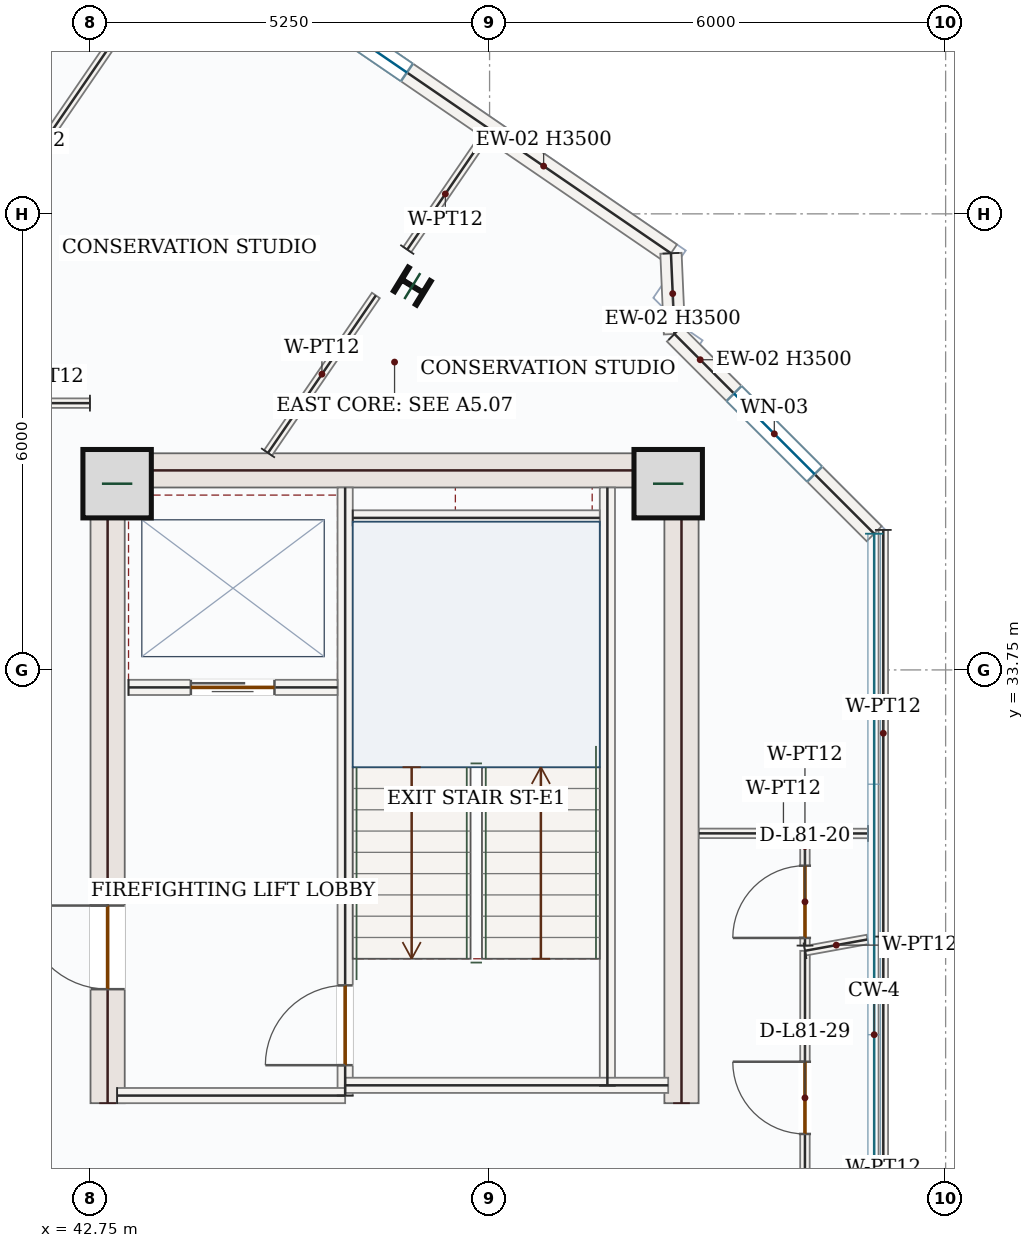
"""IFC4 building model, lengths in metres.
Left out: names, types, materials, properties, quantities, classifications, styles, units other than length and angle.
Written with IfcOpenShell. Run it as: python <this file> out.ifc"""

import sys

from ifc_helpers import new_model, si_unit, direction, frame, frame_2d, origin, origin_2d, place, context, subcontext, project, spatial, rectangle, i_section, extrude, source, transform, mapped, element, fill, save


model = new_model("IFC4")
c1 = context("Model", 3, precision=1e-05, world=origin(), true_north=direction((0.0, 1.0)))
c2 = subcontext(c1, "Body", "Model", "MODEL_VIEW")
j1 = project(units=[si_unit("LENGTHUNIT", "METRE"), si_unit("PLANEANGLEUNIT", "RADIAN")], contexts=[c1])
p1 = place(None, origin())
s1 = spatial("IfcSite", under=j1, at=p1, CompositionType="ELEMENT")
p2 = place(p1, origin())
s2 = spatial("IfcBuilding", under=s1, at=p2, CompositionType="ELEMENT")
p3 = place(p2, frame((0.0, 0.0, 334.8)))
s3 = spatial("IfcBuildingStorey", under=s2, at=p3, CompositionType="ELEMENT", Elevation=334.8)
p4 = place(p3, frame((42.975, 28.05, 0.0), z_axis=(0.0, 0.0, 1.0), x_axis=(0.0, 1.0, 0.0)))
e1 = element("IfcWall", 1, at=p4, inside=s3, PredefinedType="SHEAR", context=c2, shape_type="SweptSolid", body=[
    extrude(rectangle(XDim=8.55, YDim=0.45, at=frame_2d((4.275, 0.0))), origin(), (0.0, 0.0, 1.0), 3.5),
])
p5 = place(p4, frame((1.5, 0.0, 0.0)))
e2 = element("IfcOpeningElement", 2, at=p5, cuts=e1, PredefinedType="OPENING", context=c2, shape_type="SweptSolid", body=[
    extrude(rectangle(XDim=1.1, YDim=2.2, at=frame_2d((0.55, 1.1))), frame((0.0, 0.235, 0.0), z_axis=(0.0, -1.0, 0.0), x_axis=(1.0, 0.0, 0.0)), (0.0, 0.0, 1.0), 0.47),
])
m1 = source(origin(), c2, "Body", "SweptSolid", [
    extrude(rectangle(XDim=8.55, YDim=0.45, at=frame_2d((4.275, 0.0))), origin(), (0.0, 0.0, 1.0), 3.5),
])
p6 = place(p3, frame((50.525, 28.05, 0.0), z_axis=(0.0, 0.0, 1.0), x_axis=(0.0, 1.0, 0.0)))
e3 = element("IfcWall", 3, at=p6, inside=s3, PredefinedType="SHEAR", context=c2, shape_type="MappedRepresentation", body=[
    mapped(m1, transform((0.0, 0.0, 0.0), x_axis=(1.0, 0.0, 0.0), y_axis=(0.0, 1.0, 0.0), z_axis=(0.0, 0.0, 1.0), scale=1.0)),
])
m2 = source(origin(), c2, "Body", "SweptSolid", [
    extrude(rectangle(XDim=7.1, YDim=0.45, at=frame_2d((3.55, 0.0))), origin(), (0.0, 0.0, 1.0), 3.5),
])
p7 = place(p3, frame((43.2, 36.375, 0.0), z_axis=(0.0, 0.0, 1.0), x_axis=(1.0, 0.0, 0.0)))
e4 = element("IfcWall", 4, at=p7, inside=s3, PredefinedType="SHEAR", context=c2, shape_type="MappedRepresentation", body=[
    mapped(m2, transform((0.0, 0.0, 0.0), x_axis=(1.0, 0.0, 0.0), y_axis=(0.0, 1.0, 0.0), z_axis=(0.0, 0.0, 1.0), scale=1.0)),
])
m3 = source(origin(), c2, "Body", "SweptSolid", [
    extrude(rectangle(XDim=0.9, YDim=0.9, at=origin_2d()), origin(), (0.0, 0.0, 1.0), 3.75),
])
for number, where, z_axis, x_axis in (
    (5, (43.1, 36.2, 0.0), (0.0, 0.0, 1.0), (1.0, 0.0, 0.0)),
    (6, (50.35, 36.2, 0.0), (0.0, 0.0, 1.0), (1.0, 0.0, 0.0)),
):
    element("IfcColumn", number, at=place(p3, frame(where, z_axis=z_axis, x_axis=x_axis)), inside=s3, PredefinedType="COLUMN", context=c2, shape_type="MappedRepresentation", body=[
        mapped(m3, transform((0.0, 0.0, 0.0), x_axis=(1.0, 0.0, 0.0), y_axis=(0.0, 1.0, 0.0), z_axis=(0.0, 0.0, 1.0), scale=1.0)),
    ])
m4 = source(origin(), c2, "Body", "SweptSolid", [
    extrude(i_section(OverallWidth=0.369, OverallDepth=0.356, WebThickness=0.011, FlangeThickness=0.018, FilletRadius=0.018, at=origin_2d()), origin(), (0.0, 0.0, 1.0), 3.75),
])
p8 = place(p3, frame((46.984, 38.8, 0.0), z_axis=(0.0, 0.0, 1.0), x_axis=(0.522498564716, 0.852640164354, 0.0)))
e7 = element("IfcColumn", 7, at=p8, inside=s3, PredefinedType="COLUMN", context=c2, shape_type="MappedRepresentation", body=[
    mapped(m4, transform((0.0, 0.0, 0.0), x_axis=(1.0, 0.0, 0.0), y_axis=(0.0, 1.0, 0.0), z_axis=(0.0, 0.0, 1.0), scale=1.0)),
])
p9 = place(p3, frame((42.201, 44.836, 0.0), z_axis=(0.0, 0.0, 1.0), x_axis=(0.825121888295, -0.56495474992, 0.0)))
e8 = element("IfcWall", 8, at=p9, inside=s3, PredefinedType="SOLIDWALL", context=c2, shape_type="SweptSolid", body=[
    extrude(rectangle(XDim=9.92, YDim=0.28, at=frame_2d((4.96, 0.0))), origin(), (0.0, 0.0, 1.0), 3.5),
])
p10 = place(p9, frame((4.21, 0.0, 0.85)))
e9 = element("IfcOpeningElement", 9, at=p10, cuts=e8, PredefinedType="OPENING", context=c2, shape_type="SweptSolid", body=[
    extrude(rectangle(XDim=1.5, YDim=1.5, at=frame_2d((0.75, 0.75))), frame((0.0, 0.15, 0.0), z_axis=(0.0, -1.0, 0.0), x_axis=(1.0, 0.0, 0.0)), (0.0, 0.0, 1.0), 0.3),
])
m5 = source(origin(), c2, "Body", "SweptSolid", [
    extrude(rectangle(XDim=1.063, YDim=0.28, at=frame_2d((0.531, 0.0))), origin(), (0.0, 0.0, 1.0), 3.5),
])
p11 = place(p3, frame((50.386, 39.231, 0.0), z_axis=(0.0, 0.0, 1.0), x_axis=(0.043417286211, -0.999057025028, 0.0)))
e10 = element("IfcWall", 10, at=p11, inside=s3, PredefinedType="SOLIDWALL", context=c2, shape_type="MappedRepresentation", body=[
    mapped(m5, transform((0.0, 0.0, 0.0), x_axis=(1.0, 0.0, 0.0), y_axis=(0.0, 1.0, 0.0), z_axis=(0.0, 0.0, 1.0), scale=1.0)),
])
p12 = place(p3, frame((50.432, 38.17, 0.0), z_axis=(0.0, 0.0, 1.0), x_axis=(0.707106781187, -0.707106781187, 0.0)))
e11 = element("IfcWall", 11, at=p12, inside=s3, PredefinedType="SOLIDWALL", context=c2, shape_type="SweptSolid", body=[
    extrude(rectangle(XDim=3.716, YDim=0.28, at=frame_2d((1.858, 0.0))), origin(), (0.0, 0.0, 1.0), 3.5),
])
p13 = place(p12, frame((1.108, 0.0, 0.85)))
e12 = element("IfcOpeningElement", 12, at=p13, cuts=e11, PredefinedType="OPENING", context=c2, shape_type="SweptSolid", body=[
    extrude(rectangle(XDim=1.5, YDim=1.5, at=frame_2d((0.75, 0.75))), frame((0.0, 0.15, 0.0), z_axis=(0.0, -1.0, 0.0), x_axis=(1.0, 0.0, 0.0)), (0.0, 0.0, 1.0), 0.3),
])
m6 = source(origin(), c2, "Body", "SweptSolid", [
    extrude(rectangle(XDim=7.87, YDim=0.2, at=frame_2d((3.935, 0.0))), origin(), (0.0, 0.0, 1.0), 3.5),
])
p14 = place(p3, frame((49.55, 28.28, 0.0), z_axis=(0.0, 0.0, 1.0), x_axis=(0.0, 1.0, 0.0)))
e13 = element("IfcWall", 13, at=p14, inside=s3, PredefinedType="SOLIDWALL", context=c2, shape_type="MappedRepresentation", body=[
    mapped(m6, transform((0.0, 0.0, 0.0), x_axis=(1.0, 0.0, 0.0), y_axis=(0.0, 1.0, 0.0), z_axis=(0.0, 0.0, 1.0), scale=1.0)),
])
p15 = place(p3, frame((46.1, 28.15, 0.0), z_axis=(0.0, 0.0, 1.0), x_axis=(0.0, 1.0, 0.0)))
e14 = element("IfcWall", 14, at=p15, inside=s3, PredefinedType="SOLIDWALL", context=c2, shape_type="SweptSolid", body=[
    extrude(rectangle(XDim=8.0, YDim=0.2, at=frame_2d((4.0, 0.0))), origin(), (0.0, 0.0, 1.0), 3.5),
])
p16 = place(p15, frame((0.4, 0.0, 0.0)))
e15 = element("IfcOpeningElement", 15, at=p16, cuts=e14, PredefinedType="OPENING", context=c2, shape_type="SweptSolid", body=[
    extrude(rectangle(XDim=1.05, YDim=2.15, at=frame_2d((0.525, 1.075))), frame((0.0, 0.11, 0.0), z_axis=(0.0, -1.0, 0.0), x_axis=(1.0, 0.0, 0.0)), (0.0, 0.0, 1.0), 0.22),
])
m7 = source(origin(), c2, "Body", "SweptSolid", [
    extrude(rectangle(XDim=3.0, YDim=0.2, at=frame_2d((1.5, 0.0))), origin(), (0.0, 0.0, 1.0), 3.5),
])
p17 = place(p3, frame((43.1, 28.15, 0.0), z_axis=(0.0, 0.0, 1.0), x_axis=(1.0, 0.0, 0.0)))
e16 = element("IfcWall", 16, at=p17, inside=s3, PredefinedType="SOLIDWALL", context=c2, shape_type="MappedRepresentation", body=[
    mapped(m7, transform((0.0, 0.0, 0.0), x_axis=(1.0, 0.0, 0.0), y_axis=(0.0, 1.0, 0.0), z_axis=(0.0, 0.0, 1.0), scale=1.0)),
])
m8 = source(origin(), c2, "Body", "SweptSolid", [
    extrude(rectangle(XDim=4.25, YDim=0.2, at=frame_2d((2.125, 0.0))), origin(), (0.0, 0.0, 1.0), 3.5),
])
p18 = place(p3, frame((46.1, 28.285, 0.0), z_axis=(0.0, 0.0, 1.0), x_axis=(1.0, 0.0, 0.0)))
e17 = element("IfcWall", 17, at=p18, inside=s3, PredefinedType="SOLIDWALL", context=c2, shape_type="MappedRepresentation", body=[
    mapped(m8, transform((0.0, 0.0, 0.0), x_axis=(1.0, 0.0, 0.0), y_axis=(0.0, 1.0, 0.0), z_axis=(0.0, 0.0, 1.0), scale=1.0)),
])
m9 = source(origin(), c2, "Body", "SweptSolid", [
    extrude(rectangle(XDim=3.25, YDim=0.2, at=frame_2d((1.625, 0.0))), origin(), (0.0, 0.0, 1.0), 3.5),
])
p19 = place(p3, frame((46.2, 35.75, 0.0), z_axis=(0.0, 0.0, 1.0), x_axis=(1.0, 0.0, 0.0)))
e18 = element("IfcWall", 18, at=p19, inside=s3, PredefinedType="SOLIDWALL", context=c2, shape_type="MappedRepresentation", body=[
    mapped(m9, transform((0.0, 0.0, 0.0), x_axis=(1.0, 0.0, 0.0), y_axis=(0.0, 1.0, 0.0), z_axis=(0.0, 0.0, 1.0), scale=1.0)),
])
p20 = place(p3, frame((43.25, 33.52, 0.0), z_axis=(0.0, 0.0, 1.0), x_axis=(1.0, 0.0, 0.0)))
e19 = element("IfcWall", 19, at=p20, inside=s3, PredefinedType="SOLIDWALL", context=c2, shape_type="SweptSolid", body=[
    extrude(rectangle(XDim=2.75, YDim=0.2, at=frame_2d((1.375, 0.0))), origin(), (0.0, 0.0, 1.0), 3.5),
])
p21 = place(p20, frame((0.82, 0.0, 0.0)))
e20 = element("IfcOpeningElement", 20, at=p21, cuts=e19, PredefinedType="OPENING", context=c2, shape_type="SweptSolid", body=[
    extrude(rectangle(XDim=1.1, YDim=2.15, at=frame_2d((0.55, 1.075))), frame((0.0, 0.11, 0.0), z_axis=(0.0, -1.0, 0.0), x_axis=(1.0, 0.0, 0.0)), (0.0, 0.0, 1.0), 0.22),
])
p22 = place(p3, frame((52.147, 22.47, 0.0), z_axis=(0.0, 0.0, 1.0), x_axis=(0.000321874581, 0.999999948198, 0.0)))
e21 = element("IfcWall", 21, at=p22, inside=s3, PredefinedType="PARTITIONING", context=c2, shape_type="SweptSolid", body=[
    extrude(rectangle(XDim=7.585, YDim=0.125, at=frame_2d((3.792, 0.0))), origin(), (0.0, 0.0, 1.0), 3.5),
])
p23 = place(p22, frame((5.175, 0.0, 0.0)))
e22 = element("IfcOpeningElement", 22, at=p23, cuts=e21, PredefinedType="OPENING", context=c2, shape_type="SweptSolid", body=[
    extrude(rectangle(XDim=0.95, YDim=2.15, at=frame_2d((0.475, 1.075))), frame((0.0, 0.073, 0.0), z_axis=(0.0, -1.0, 0.0), x_axis=(1.0, 0.0, 0.0)), (0.0, 0.0, 1.0), 0.145),
])
m10 = source(origin(), c2, "Body", "SweptSolid", [
    extrude(rectangle(XDim=0.836, YDim=0.125, at=frame_2d((0.418, 0.0))), origin(), (0.0, 0.0, 1.0), 3.5),
])
p24 = place(p3, frame((52.15, 30.055, 0.0), z_axis=(0.0, 0.0, 1.0), x_axis=(0.983949253333, 0.178448499195, 0.0)))
e23 = element("IfcWall", 23, at=p24, inside=s3, PredefinedType="PARTITIONING", context=c2, shape_type="MappedRepresentation", body=[
    mapped(m10, transform((0.0, 0.0, 0.0), x_axis=(1.0, 0.0, 0.0), y_axis=(0.0, 1.0, 0.0), z_axis=(0.0, 0.0, 1.0), scale=1.0)),
])
m11 = source(origin(), c2, "Body", "SweptSolid", [
    extrude(rectangle(XDim=6.777, YDim=0.125, at=frame_2d((3.388, 0.0))), origin(), (0.0, 0.0, 1.0), 3.5),
])
p25 = place(p3, frame((53.18, 30.242, 0.0), z_axis=(0.0, 0.0, 1.0), x_axis=(7.2053896e-05, -0.999999997404, 0.0)))
e24 = element("IfcWall", 24, at=p25, inside=s3, PredefinedType="PARTITIONING", context=c2, shape_type="MappedRepresentation", body=[
    mapped(m11, transform((0.0, 0.0, 0.0), x_axis=(1.0, 0.0, 0.0), y_axis=(0.0, 1.0, 0.0), z_axis=(0.0, 0.0, 1.0), scale=1.0)),
])
m12 = source(origin(), c2, "Body", "SweptSolid", [
    extrude(rectangle(XDim=2.223, YDim=0.125, at=frame_2d((1.111, 0.0))), origin(), (0.0, 0.0, 1.0), 3.5),
])
p26 = place(p3, frame((52.978, 31.598, 0.0), z_axis=(0.0, 0.0, 1.0), x_axis=(-0.999999704402, 0.000768892567, 0.0)))
e25 = element("IfcWall", 25, at=p26, inside=s3, PredefinedType="PARTITIONING", context=c2, shape_type="MappedRepresentation", body=[
    mapped(m12, transform((0.0, 0.0, 0.0), x_axis=(1.0, 0.0, 0.0), y_axis=(0.0, 1.0, 0.0), z_axis=(0.0, 0.0, 1.0), scale=1.0)),
])
m13 = source(origin(), c2, "Body", "SweptSolid", [
    extrude(rectangle(XDim=2.511, YDim=0.125, at=frame_2d((1.255, 0.0))), origin(), (0.0, 0.0, 1.0), 3.5),
])
p27 = place(p3, frame((45.085, 36.605, 0.0), z_axis=(0.0, 0.0, 1.0), x_axis=(0.564980194272, 0.825104466162, 0.0)))
e26 = element("IfcWall", 26, at=p27, inside=s3, PredefinedType="PARTITIONING", context=c2, shape_type="MappedRepresentation", body=[
    mapped(m13, transform((0.0, 0.0, 0.0), x_axis=(1.0, 0.0, 0.0), y_axis=(0.0, 1.0, 0.0), z_axis=(0.0, 0.0, 1.0), scale=1.0)),
])
m14 = source(origin(), c2, "Body", "SweptSolid", [
    extrude(rectangle(XDim=1.775, YDim=0.125, at=frame_2d((0.888, 0.0))), origin(), (0.0, 0.0, 1.0), 3.5),
])
p28 = place(p3, frame((46.917, 39.28, 0.0), z_axis=(0.0, 0.0, 1.0), x_axis=(0.56509798207, 0.825023800057, 0.0)))
e27 = element("IfcWall", 27, at=p28, inside=s3, PredefinedType="PARTITIONING", context=c2, shape_type="MappedRepresentation", body=[
    mapped(m14, transform((0.0, 0.0, 0.0), x_axis=(1.0, 0.0, 0.0), y_axis=(0.0, 1.0, 0.0), z_axis=(0.0, 0.0, 1.0), scale=1.0)),
])
m15 = source(origin(), c2, "Body", "SweptSolid", [
    extrude(rectangle(XDim=5.35, YDim=0.125, at=frame_2d((2.675, 0.0))), origin(), (0.0, 0.0, 1.0), 3.5),
])
p29 = place(p3, frame((53.18, 35.592, 0.0), z_axis=(0.0, 0.0, 1.0), x_axis=(0.0, -1.0, 0.0)))
e28 = element("IfcWall", 28, at=p29, inside=s3, PredefinedType="PARTITIONING", context=c2, shape_type="MappedRepresentation", body=[
    mapped(m15, transform((0.0, 0.0, 0.0), x_axis=(1.0, 0.0, 0.0), y_axis=(0.0, 1.0, 0.0), z_axis=(0.0, 0.0, 1.0), scale=1.0)),
])
p30 = place(p3, frame((52.15, 30.124, 0.0), z_axis=(0.0, 0.0, 1.0), x_axis=(-0.000520201074, 0.999999864695, 0.0)))
e29 = element("IfcWall", 29, at=p30, inside=s3, PredefinedType="PARTITIONING", context=c2, shape_type="SweptSolid", body=[
    extrude(rectangle(XDim=1.408, YDim=0.125, at=frame_2d((0.704, 0.0))), origin(), (0.0, 0.0, 1.0), 3.5),
])
p31 = place(p30, frame((0.101, 0.0, 0.0)))
e30 = element("IfcOpeningElement", 30, at=p31, cuts=e29, PredefinedType="OPENING", context=c2, shape_type="SweptSolid", body=[
    extrude(rectangle(XDim=0.95, YDim=2.15, at=frame_2d((0.475, 1.075))), frame((0.0, 0.073, 0.0), z_axis=(0.0, -1.0, 0.0), x_axis=(1.0, 0.0, 0.0)), (0.0, 0.0, 1.0), 0.145),
])
p32 = place(p3, frame((42.742, 37.26, 0.0), z_axis=(0.0, 0.0, 1.0), x_axis=(-0.999999996583, 8.2671957e-05, 0.0)))
e31 = element("IfcWall", 31, at=p32, inside=s3, PredefinedType="PARTITIONING", context=c2, shape_type="SweptSolid", body=[
    extrude(rectangle(XDim=2.953, YDim=0.125, at=frame_2d((1.477, 0.0))), origin(), (0.0, 0.0, 1.0), 3.5),
])
p33 = place(p32, frame((1.302, 0.0, 0.0)))
e32 = element("IfcOpeningElement", 32, at=p33, cuts=e31, PredefinedType="OPENING", context=c2, shape_type="SweptSolid", body=[
    extrude(rectangle(XDim=0.95, YDim=2.15, at=frame_2d((0.475, 1.075))), frame((0.0, 0.073, 0.0), z_axis=(0.0, -1.0, 0.0), x_axis=(1.0, 0.0, 0.0)), (0.0, 0.0, 1.0), 0.145),
])
m16 = source(origin(), c2, "Body", "SweptSolid", [
    extrude(rectangle(XDim=7.387, YDim=0.125, at=frame_2d((3.693, 0.0))), origin(), (0.0, 0.0, 1.0), 3.5),
])
p34 = place(p3, frame((39.835, 37.327, 0.0), z_axis=(0.0, 0.0, 1.0), x_axis=(0.564969427755, 0.8251118383, 0.0)))
e33 = element("IfcWall", 33, at=p34, inside=s3, PredefinedType="PARTITIONING", context=c2, shape_type="MappedRepresentation", body=[
    mapped(m16, transform((0.0, 0.0, 0.0), x_axis=(1.0, 0.0, 0.0), y_axis=(0.0, 1.0, 0.0), z_axis=(0.0, 0.0, 1.0), scale=1.0)),
])
m17 = source(origin(), c2, "Body", "SweptSolid", [
    extrude(rectangle(XDim=1.5, YDim=1.5, at=frame_2d((0.75, 0.75))), frame((0.0, 0.03, 0.0), z_axis=(0.0, -1.0, 0.0), x_axis=(1.0, 0.0, 0.0)), (0.0, 0.0, 1.0), 0.06),
])
p35 = place(p10, origin())
e34 = element("IfcWindow", 34, at=p35, inside=s3, PartitioningType="SINGLE_PANEL", PredefinedType="WINDOW", context=c2, shape_type="MappedRepresentation", body=[
    mapped(m17, transform((0.0, 0.0, 0.0), x_axis=(1.0, 0.0, 0.0), y_axis=(0.0, 1.0, 0.0), z_axis=(0.0, 0.0, 1.0), scale=1.0)),
])
fill(e9, e34)
p36 = place(p13, origin())
e35 = element("IfcWindow", 35, at=p36, inside=s3, PartitioningType="SINGLE_PANEL", PredefinedType="WINDOW", context=c2, shape_type="MappedRepresentation", body=[
    mapped(m17, transform((0.0, 0.0, 0.0), x_axis=(1.0, 0.0, 0.0), y_axis=(0.0, 1.0, 0.0), z_axis=(0.0, 0.0, 1.0), scale=1.0)),
])
fill(e12, e35)
m18 = source(origin(), c2, "Body", "SweptSolid", [
    extrude(rectangle(XDim=1.05, YDim=2.15, at=frame_2d((0.525, 1.075))), frame((0.0, 0.025, 0.0), z_axis=(0.0, -1.0, 0.0), x_axis=(1.0, 0.0, 0.0)), (0.0, 0.0, 1.0), 0.05),
])
p37 = place(p16, origin())
e36 = element("IfcDoor", 36, at=p37, inside=s3, OperationType="SINGLE_SWING_LEFT", PredefinedType="DOOR", context=c2, shape_type="MappedRepresentation", body=[
    mapped(m18, transform((0.0, 0.0, 0.0), x_axis=(1.0, 0.0, 0.0), y_axis=(0.0, 1.0, 0.0), z_axis=(0.0, 0.0, 1.0), scale=1.0)),
])
fill(e15, e36)
m19 = source(origin(), c2, "Body", "SweptSolid", [
    extrude(rectangle(XDim=1.1, YDim=2.15, at=frame_2d((0.55, 1.075))), frame((0.0, 0.025, 0.0), z_axis=(0.0, -1.0, 0.0), x_axis=(1.0, 0.0, 0.0)), (0.0, 0.0, 1.0), 0.05),
])
p38 = place(p21, origin())
e37 = element("IfcDoor", 37, at=p38, inside=s3, OperationType="DOUBLE_DOOR_SLIDING", PredefinedType="DOOR", context=c2, shape_type="MappedRepresentation", body=[
    mapped(m19, transform((0.0, 0.0, 0.0), x_axis=(1.0, 0.0, 0.0), y_axis=(0.0, 1.0, 0.0), z_axis=(0.0, 0.0, 1.0), scale=1.0)),
])
fill(e20, e37)
m20 = source(origin(), c2, "Body", "SweptSolid", [
    extrude(rectangle(XDim=1.1, YDim=2.2, at=frame_2d((0.55, 1.1))), frame((0.0, 0.025, 0.0), z_axis=(0.0, -1.0, 0.0), x_axis=(1.0, 0.0, 0.0)), (0.0, 0.0, 1.0), 0.05),
])
p39 = place(p5, origin())
e38 = element("IfcDoor", 38, at=p39, inside=s3, OperationType="SINGLE_SWING_RIGHT", PredefinedType="DOOR", context=c2, shape_type="MappedRepresentation", body=[
    mapped(m20, transform((0.0, 0.0, 0.0), x_axis=(1.0, 0.0, 0.0), y_axis=(0.0, 1.0, 0.0), z_axis=(0.0, 0.0, 1.0), scale=1.0)),
])
fill(e2, e38)
m21 = source(origin(), c2, "Body", "SweptSolid", [
    extrude(rectangle(XDim=0.95, YDim=2.15, at=frame_2d((0.475, 1.075))), frame((0.0, 0.025, 0.0), z_axis=(0.0, -1.0, 0.0), x_axis=(1.0, 0.0, 0.0)), (0.0, 0.0, 1.0), 0.05),
])
p40 = place(p31, origin())
e39 = element("IfcDoor", 39, at=p40, inside=s3, OperationType="SINGLE_SWING_LEFT", PredefinedType="DOOR", context=c2, shape_type="MappedRepresentation", body=[
    mapped(m21, transform((0.0, 0.0, 0.0), x_axis=(1.0, 0.0, 0.0), y_axis=(0.0, 1.0, 0.0), z_axis=(0.0, 0.0, 1.0), scale=1.0)),
])
fill(e30, e39)
p41 = place(p23, origin())
e40 = element("IfcDoor", 40, at=p41, inside=s3, OperationType="SINGLE_SWING_RIGHT", PredefinedType="DOOR", context=c2, shape_type="MappedRepresentation", body=[
    mapped(m21, transform((0.0, 0.0, 0.0), x_axis=(1.0, 0.0, 0.0), y_axis=(0.0, 1.0, 0.0), z_axis=(0.0, 0.0, 1.0), scale=1.0)),
])
fill(e22, e40)
save(model, sys.argv[1])
